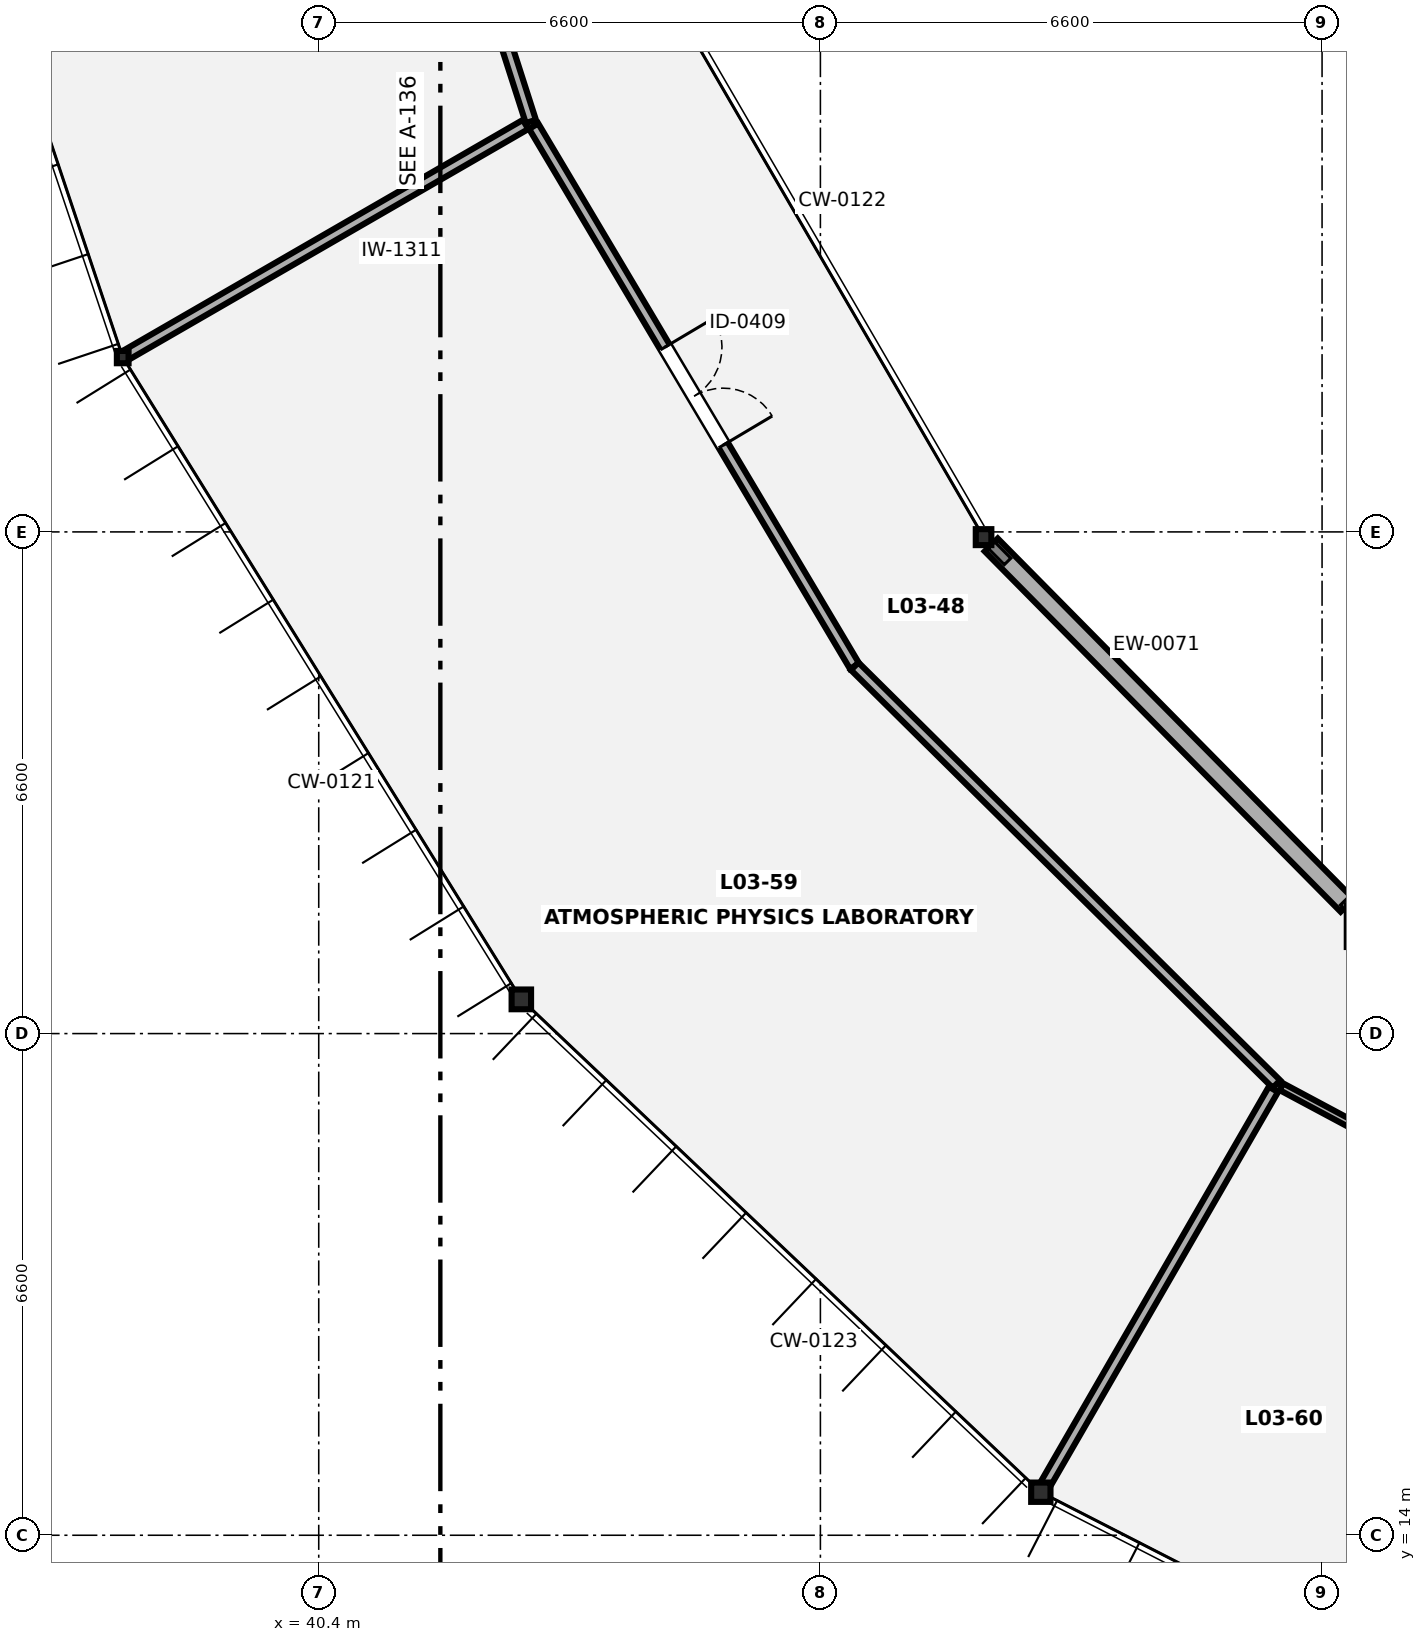
"""IFC4 building model, lengths in metres.
Left out: names, types, materials, properties, quantities, classifications, styles, units other than length and angle.
Written with IfcOpenShell. Run it as: python <this file> out.ifc"""

import sys

from ifc_helpers import new_model, si_unit, direction, frame, frame_2d, origin, origin_2d, place, context, subcontext, project, spatial, rectangle, i_section, extrude, element, fill, save


model = new_model("IFC4")
c1 = context("Model", 3, precision=1e-05, world=origin(), true_north=direction((0.0, 1.0)))
c2 = subcontext(c1, "Body", "Model", "MODEL_VIEW")
j1 = project(units=[si_unit("LENGTHUNIT", "METRE"), si_unit("PLANEANGLEUNIT", "RADIAN")], contexts=[c1])
p1 = place(None, origin())
s1 = spatial("IfcSite", under=j1, at=p1, CompositionType="ELEMENT")
p2 = place(p1, origin())
s2 = spatial("IfcBuilding", under=s1, at=p2, CompositionType="ELEMENT")
p3 = place(p2, frame((0.0, 0.0, 13.3)))
s3 = spatial("IfcBuildingStorey", under=s2, at=p3, CompositionType="ELEMENT", Elevation=13.3)
p4 = place(p3, frame((37.821, 29.5, 0.0), z_axis=(0.0, 0.0, 1.0), x_axis=(1.0, 0.0, 0.0)))
e1 = element("IfcColumn", 1, at=p4, inside=s3, PredefinedType="COLUMN", context=c2, shape_type="SweptSolid", body=[
    extrude(i_section(OverallWidth=0.154, OverallDepth=0.162, WebThickness=0.008, FlangeThickness=0.011, FilletRadius=0.009, at=origin_2d()), origin(), (0.0, 0.0, 1.0), 4.2),
])
p5 = place(p3, frame((43.065, 21.05, 0.0), z_axis=(0.0, 0.0, 1.0), x_axis=(1.0, 0.0, 0.0)))
e2 = element("IfcColumn", 2, at=p5, inside=s3, PredefinedType="COLUMN", context=c2, shape_type="SweptSolid", body=[
    extrude(i_section(OverallWidth=0.256, OverallDepth=0.26, WebThickness=0.01, FlangeThickness=0.017, FilletRadius=0.014, at=origin_2d()), origin(), (0.0, 0.0, 1.0), 4.2),
])
p6 = place(p3, frame((49.146, 27.131, 0.0), z_axis=(0.0, 0.0, 1.0), x_axis=(1.0, 0.0, 0.0)))
e3 = element("IfcColumn", 3, at=p6, inside=s3, PredefinedType="COLUMN", context=c2, shape_type="SweptSolid", body=[
    extrude(i_section(OverallWidth=0.205, OverallDepth=0.21, WebThickness=0.009, FlangeThickness=0.014, FilletRadius=0.011, at=origin_2d()), origin(), (0.0, 0.0, 1.0), 4.2),
])
p7 = place(p3, frame((49.9, 14.566, 0.0), z_axis=(0.0, 0.0, 1.0), x_axis=(1.0, 0.0, 0.0)))
e4 = element("IfcColumn", 4, at=p7, inside=s3, PredefinedType="COLUMN", context=c2, shape_type="SweptSolid", body=[
    extrude(i_section(OverallWidth=0.254, OverallDepth=0.254, WebThickness=0.009, FlangeThickness=0.014, FilletRadius=0.014, at=origin_2d()), origin(), (0.0, 0.0, 1.0), 4.2),
])
p8 = place(p3, frame((49.248, 27.029, 0.0), z_axis=(0.0, 0.0, 1.0), x_axis=(0.702641034555, -0.711544500759, 0.0)))
e5 = element("IfcWall", 5, at=p8, inside=s3, PredefinedType="SOLIDWALL", context=c2, shape_type="SweptSolid", body=[
    extrude(rectangle(XDim=6.663, YDim=0.24, at=frame_2d((3.332, 0.0))), origin(), (0.0, 0.0, 1.0), 3.65),
])
p9 = place(p3, frame((40.513, 40.945, 0.0), z_axis=(0.0, 0.0, 1.0), x_axis=(0.305493323507, -0.952194218263, 0.0)))
e6 = element("IfcWall", 6, at=p9, inside=s3, PredefinedType="PARTITIONING", context=c2, shape_type="SweptSolid", body=[
    extrude(rectangle(XDim=8.764, YDim=0.14, at=frame_2d((4.382, 0.0))), origin(), (0.0, 0.0, 1.0), 3.98),
])
p10 = place(p9, frame((3.857, 0.0, 0.0)))
e7 = element("IfcOpeningElement", 7, at=p10, cuts=e6, PredefinedType="OPENING", context=c2, shape_type="SweptSolid", body=[
    extrude(rectangle(XDim=1.05, YDim=2.15, at=frame_2d((0.525, 1.075))), frame((0.0, 0.08, 0.0), z_axis=(0.0, -1.0, 0.0), x_axis=(1.0, 0.0, 0.0)), (0.0, 0.0, 1.0), 0.16),
])
p11 = place(p3, frame((43.121, 32.56, 0.0), z_axis=(0.0, 0.0, 1.0), x_axis=(-0.866010470582, -0.500025864173, 0.0)))
e8 = element("IfcWall", 8, at=p11, inside=s3, PredefinedType="PARTITIONING", context=c2, shape_type="SweptSolid", body=[
    extrude(rectangle(XDim=6.06, YDim=0.14, at=frame_2d((3.03, 0.0))), origin(), (0.0, 0.0, 1.0), 3.471),
])
p12 = place(p3, frame((43.227, 32.538, 0.0), z_axis=(0.0, 0.0, 1.0), x_axis=(0.510911392115, -0.859633380812, 0.0)))
e9 = element("IfcWall", 9, at=p12, inside=s3, PredefinedType="PARTITIONING", context=c2, shape_type="SweptSolid", body=[
    extrude(rectangle(XDim=8.264, YDim=0.14, at=frame_2d((4.132, 0.0))), origin(), (0.0, 0.0, 1.0), 3.98),
])
p13 = place(p12, frame((3.382, 0.0, 0.0)))
e10 = element("IfcOpeningElement", 10, at=p13, cuts=e9, PredefinedType="OPENING", context=c2, shape_type="SweptSolid", body=[
    extrude(rectangle(XDim=1.5, YDim=2.15, at=frame_2d((0.75, 1.075))), frame((0.0, 0.08, 0.0), z_axis=(0.0, -1.0, 0.0), x_axis=(1.0, 0.0, 0.0)), (0.0, 0.0, 1.0), 0.16),
])
p14 = place(p3, frame((47.451, 25.433, 0.0), z_axis=(0.0, 0.0, 1.0), x_axis=(0.710427757183, -0.703770134222, 0.0)))
e11 = element("IfcWall", 11, at=p14, inside=s3, PredefinedType="PARTITIONING", context=c2, shape_type="SweptSolid", body=[
    extrude(rectangle(XDim=7.811, YDim=0.14, at=frame_2d((3.905, 0.0))), origin(), (0.0, 0.0, 1.0), 3.98),
])
p15 = place(p3, frame((52.96, 19.866, 0.0), z_axis=(0.0, 0.0, 1.0), x_axis=(-0.500008418462, -0.866020543329, 0.0)))
e12 = element("IfcWall", 12, at=p15, inside=s3, PredefinedType="PARTITIONING", context=c2, shape_type="SweptSolid", body=[
    extrude(rectangle(XDim=6.06, YDim=0.14, at=frame_2d((3.03, 0.0))), origin(), (0.0, 0.0, 1.0), 3.313),
])
p16 = place(p3, frame((53.063, 19.902, 0.0), z_axis=(0.0, 0.0, 1.0), x_axis=(0.881826283139, -0.471574391125, 0.0)))
e13 = element("IfcWall", 13, at=p16, inside=s3, PredefinedType="PARTITIONING", context=c2, shape_type="SweptSolid", body=[
    extrude(rectangle(XDim=7.258, YDim=0.1, at=frame_2d((3.629, 0.0))), origin(), (0.0, 0.0, 1.0), 3.98),
])
p17 = place(p16, frame((3.129, 0.0, 0.0)))
e14 = element("IfcOpeningElement", 14, at=p17, cuts=e13, PredefinedType="OPENING", context=c2, shape_type="SweptSolid", body=[
    extrude(rectangle(XDim=1.0, YDim=2.1, at=frame_2d((0.5, 1.05))), frame((0.0, 0.06, 0.0), z_axis=(0.0, -1.0, 0.0), x_axis=(1.0, 0.0, 0.0)), (0.0, 0.0, 1.0), 0.12),
])
p18 = place(p13, origin())
e15 = element("IfcDoor", 15, at=p18, inside=s3, OperationType="DOUBLE_DOOR_SINGLE_SWING", PredefinedType="DOOR", context=c2, shape_type="SweptSolid", body=[
    extrude(rectangle(XDim=1.5, YDim=2.15, at=frame_2d((0.75, 1.075))), frame((0.0, 0.025, 0.0), z_axis=(0.0, -1.0, 0.0), x_axis=(1.0, 0.0, 0.0)), (0.0, 0.0, 1.0), 0.05),
])
fill(e10, e15)
save(model, sys.argv[1])
